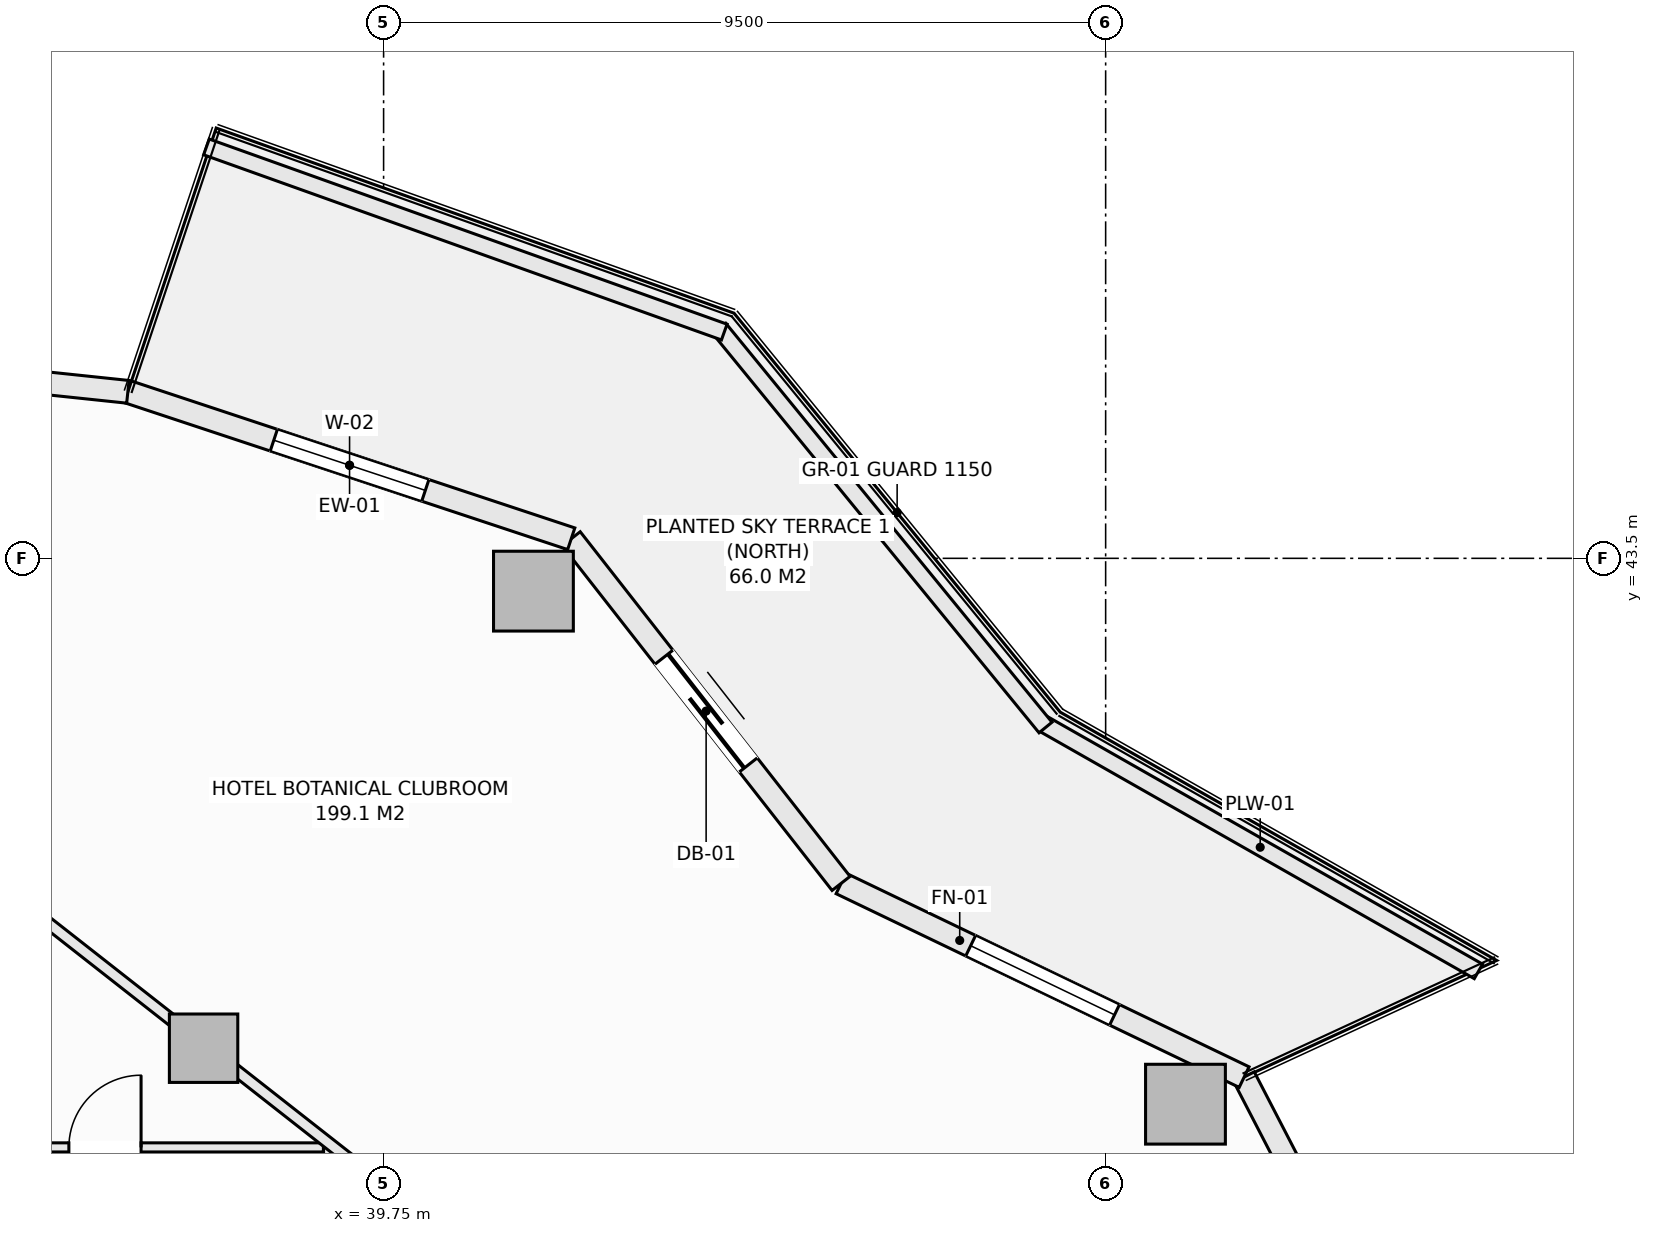
"""IFC4 building model, lengths in metres.
Left out: names, types, materials, properties, quantities, classifications, styles, units other than length and angle.
Written with IfcOpenShell. Run it as: python <this file> out.ifc"""

import sys

from ifc_helpers import new_model, si_unit, direction, frame, frame_2d, origin, origin_2d, place, context, subcontext, project, spatial, rectangle, extrude, element, fill, save


model = new_model("IFC4")
c1 = context("Model", 3, precision=1e-05, world=origin(), true_north=direction((0.0, 1.0)))
c2 = subcontext(c1, "Body", "Model", "MODEL_VIEW")
j1 = project(units=[si_unit("LENGTHUNIT", "METRE"), si_unit("PLANEANGLEUNIT", "RADIAN")], contexts=[c1])
p1 = place(None, origin())
s1 = spatial("IfcSite", under=j1, at=p1, CompositionType="ELEMENT")
p2 = place(p1, origin())
s2 = spatial("IfcBuilding", under=s1, at=p2, CompositionType="ELEMENT")
p3 = place(p2, frame((0.0, 0.0, 115.5)))
s3 = spatial("IfcBuildingStorey", under=s2, at=p3, CompositionType="ELEMENT", Elevation=115.5)
for number, where, z_axis, x_axis in (
    (1, (50.3, 36.319, -0.27), (0.0, 0.0, 1.0), (1.0, 0.0, 0.0)),
    (2, (41.721, 43.068, -0.27), (0.0, 0.0, 1.0), (1.0, 0.0, 0.0)),
):
    element("IfcColumn", number, at=place(p3, frame(where, z_axis=z_axis, x_axis=x_axis)), inside=s3, PredefinedType="COLUMN", context=c2, shape_type="SweptSolid", body=[
        extrude(rectangle(XDim=1.05, YDim=1.05, at=origin_2d()), origin(), (0.0, 0.0, 1.0), 3.4),
    ])
p4 = place(p3, frame((37.382, 37.055, -0.27), z_axis=(0.0, 0.0, 1.0), x_axis=(1.0, 0.0, 0.0)))
e3 = element("IfcColumn", 3, at=p4, inside=s3, PredefinedType="COLUMN", context=c2, shape_type="SweptSolid", body=[
    extrude(rectangle(XDim=0.9, YDim=0.9, at=origin_2d()), origin(), (0.0, 0.0, 1.0), 3.4),
])
p5 = place(p3, frame((51.072, 36.675, 0.0), z_axis=(0.0, 0.0, 1.0), x_axis=(0.459767899643, -0.888039119892, 0.0)))
e4 = element("IfcWall", 4, at=p5, inside=s3, PredefinedType="SOLIDWALL", context=c2, shape_type="SweptSolid", body=[
    extrude(rectangle(XDim=5.255, YDim=0.3, at=frame_2d((2.628, 0.0))), origin(), (0.0, 0.0, 1.0), 2.653),
])
p6 = place(p5, frame((1.578, 0.0, 0.74)))
e5 = element("IfcOpeningElement", 5, at=p6, cuts=e4, PredefinedType="OPENING", context=c2, shape_type="SweptSolid", body=[
    extrude(rectangle(XDim=2.1, YDim=1.7, at=frame_2d((1.05, 0.85))), frame((0.0, 0.16, 0.0), z_axis=(0.0, -1.0, 0.0), x_axis=(1.0, 0.0, 0.0)), (0.0, 0.0, 1.0), 0.32),
])
p7 = place(p3, frame((45.769, 39.223, 0.0), z_axis=(0.0, 0.0, 1.0), x_axis=(0.901370184739, -0.433049408339, 0.0)))
e6 = element("IfcWall", 6, at=p7, inside=s3, PredefinedType="SOLIDWALL", context=c2, shape_type="SweptSolid", body=[
    extrude(rectangle(XDim=5.884, YDim=0.3, at=frame_2d((2.942, 0.0))), origin(), (0.0, 0.0, 1.0), 2.653),
])
p8 = place(p7, frame((1.892, 0.0, 0.74)))
e7 = element("IfcOpeningElement", 7, at=p8, cuts=e6, PredefinedType="OPENING", context=c2, shape_type="SweptSolid", body=[
    extrude(rectangle(XDim=2.1, YDim=1.7, at=frame_2d((1.05, 0.85))), frame((0.0, 0.16, 0.0), z_axis=(0.0, -1.0, 0.0), x_axis=(1.0, 0.0, 0.0)), (0.0, 0.0, 1.0), 0.32),
])
p9 = place(p3, frame((42.219, 43.758, 0.0), z_axis=(0.0, 0.0, 1.0), x_axis=(0.616435134162, -0.787405693001, 0.0)))
e8 = element("IfcWall", 8, at=p9, inside=s3, PredefinedType="SOLIDWALL", context=c2, shape_type="SweptSolid", body=[
    extrude(rectangle(XDim=5.759, YDim=0.3, at=frame_2d((2.879, 0.0))), origin(), (0.0, 0.0, 1.0), 2.653),
])
p10 = place(p9, frame((1.979, 0.0, 0.0)))
e9 = element("IfcOpeningElement", 9, at=p10, cuts=e8, PredefinedType="OPENING", context=c2, shape_type="SweptSolid", body=[
    extrude(rectangle(XDim=1.8, YDim=2.25, at=frame_2d((0.9, 1.125))), frame((0.0, 0.16, 0.0), z_axis=(0.0, -1.0, 0.0), x_axis=(1.0, 0.0, 0.0)), (0.0, 0.0, 1.0), 0.32),
])
p11 = place(p3, frame((36.385, 45.691, 0.0), z_axis=(0.0, 0.0, 1.0), x_axis=(0.949238009374, -0.314558741032, 0.0)))
e10 = element("IfcWall", 10, at=p11, inside=s3, PredefinedType="SOLIDWALL", context=c2, shape_type="SweptSolid", body=[
    extrude(rectangle(XDim=6.146, YDim=0.3, at=frame_2d((3.073, 0.0))), origin(), (0.0, 0.0, 1.0), 2.653),
])
p12 = place(p11, frame((2.023, 0.0, 0.74)))
e11 = element("IfcOpeningElement", 11, at=p12, cuts=e10, PredefinedType="OPENING", context=c2, shape_type="SweptSolid", body=[
    extrude(rectangle(XDim=2.1, YDim=1.7, at=frame_2d((1.05, 0.85))), frame((0.0, 0.16, 0.0), z_axis=(0.0, -1.0, 0.0), x_axis=(1.0, 0.0, 0.0)), (0.0, 0.0, 1.0), 0.32),
])
p13 = place(p3, frame((30.125, 46.35, 0.0), z_axis=(0.0, 0.0, 1.0), x_axis=(0.994498012394, -0.104755445421, 0.0)))
e12 = element("IfcWall", 12, at=p13, inside=s3, PredefinedType="SOLIDWALL", context=c2, shape_type="SweptSolid", body=[
    extrude(rectangle(XDim=6.295, YDim=0.3, at=frame_2d((3.147, 0.0))), origin(), (0.0, 0.0, 1.0), 2.653),
])
p14 = place(p13, frame((2.097, 0.0, 0.74)))
e13 = element("IfcOpeningElement", 13, at=p14, cuts=e12, PredefinedType="OPENING", context=c2, shape_type="SweptSolid", body=[
    extrude(rectangle(XDim=2.1, YDim=1.7, at=frame_2d((1.05, 0.85))), frame((0.0, 0.16, 0.0), z_axis=(0.0, -1.0, 0.0), x_axis=(1.0, 0.0, 0.0)), (0.0, 0.0, 1.0), 0.32),
])
p15 = place(p3, frame((48.413, 41.332, 0.0), z_axis=(0.0, 0.0, 1.0), x_axis=(0.869187658335, -0.494482370361, 0.0)))
e14 = element("IfcWall", 14, at=p15, inside=s3, PredefinedType="PARAPET", context=c2, shape_type="SweptSolid", body=[
    extrude(rectangle(XDim=6.606, YDim=0.22, at=frame_2d((3.303, 0.0))), origin(), (0.0, 0.0, 1.0), 0.52),
])
p16 = place(p3, frame((44.167, 46.523, 0.0), z_axis=(0.0, 0.0, 1.0), x_axis=(0.633002467947, -0.77414977593, 0.0)))
e15 = element("IfcWall", 15, at=p16, inside=s3, PredefinedType="PARAPET", context=c2, shape_type="SweptSolid", body=[
    extrude(rectangle(XDim=6.78, YDim=0.22, at=frame_2d((3.39, 0.0))), origin(), (0.0, 0.0, 1.0), 0.52),
])
p17 = place(p3, frame((37.419, 48.913, 0.0), z_axis=(0.0, 0.0, 1.0), x_axis=(0.941632697311, -0.336642040387, 0.0)))
e16 = element("IfcWall", 16, at=p17, inside=s3, PredefinedType="PARAPET", context=c2, shape_type="SweptSolid", body=[
    extrude(rectangle(XDim=7.236, YDim=0.22, at=frame_2d((3.618, 0.0))), origin(), (0.0, 0.0, 1.0), 0.52),
])
p18 = place(p3, frame((39.02, 33.75, 0.0), z_axis=(0.0, 0.0, 1.0), x_axis=(0.0, 1.0, 0.0)))
e17 = element("IfcWall", 17, at=p18, inside=s3, PredefinedType="PARTITIONING", context=c2, shape_type="SweptSolid", body=[
    extrude(rectangle(XDim=2.0, YDim=0.12, at=frame_2d((1.0, 0.0))), origin(), (0.0, 0.0, 1.0), 3.13),
])
p19 = place(p3, frame((34.05, 35.75, 0.0), z_axis=(0.0, 0.0, 1.0), x_axis=(1.0, 0.0, 0.0)))
e18 = element("IfcWall", 18, at=p19, inside=s3, PredefinedType="PARTITIONING", context=c2, shape_type="SweptSolid", body=[
    extrude(rectangle(XDim=4.908, YDim=0.12, at=frame_2d((2.454, 0.0))), origin(), (0.0, 0.0, 1.0), 2.505),
])
p20 = place(p19, frame((1.559, 0.0, 0.0)))
e19 = element("IfcOpeningElement", 19, at=p20, cuts=e18, PredefinedType="OPENING", context=c2, shape_type="SweptSolid", body=[
    extrude(rectangle(XDim=0.95, YDim=2.1, at=frame_2d((0.475, 1.05))), frame((0.0, 0.07, 0.0), z_axis=(0.0, -1.0, 0.0), x_axis=(1.0, 0.0, 0.0)), (0.0, 0.0, 1.0), 0.14),
])
p21 = place(p3, frame((34.112, 39.661, 0.0), z_axis=(0.0, 0.0, 1.0), x_axis=(0.786863471843, -0.617127115495, 0.0)))
e20 = element("IfcWall", 20, at=p21, inside=s3, PredefinedType="PARTITIONING", context=c2, shape_type="SweptSolid", body=[
    extrude(rectangle(XDim=14.103, YDim=0.15, at=frame_2d((7.052, 0.0))), origin(), (0.0, 0.0, 1.0), 2.505),
])
p22 = place(p8, origin())
e21 = element("IfcWindow", 21, at=p22, inside=s3, PartitioningType="SINGLE_PANEL", PredefinedType="WINDOW", context=c2, shape_type="SweptSolid", body=[
    extrude(rectangle(XDim=2.1, YDim=1.7, at=frame_2d((1.05, 0.85))), frame((0.0, 0.03, 0.0), z_axis=(0.0, -1.0, 0.0), x_axis=(1.0, 0.0, 0.0)), (0.0, 0.0, 1.0), 0.06),
])
fill(e7, e21)
p23 = place(p10, origin())
e22 = element("IfcDoor", 22, at=p23, inside=s3, OperationType="SLIDING_TO_LEFT", PredefinedType="DOOR", context=c2, shape_type="SweptSolid", body=[
    extrude(rectangle(XDim=1.8, YDim=2.25, at=frame_2d((0.9, 1.125))), frame((0.0, 0.025, 0.0), z_axis=(0.0, -1.0, 0.0), x_axis=(1.0, 0.0, 0.0)), (0.0, 0.0, 1.0), 0.05),
])
fill(e9, e22)
p24 = place(p12, origin())
e23 = element("IfcWindow", 23, at=p24, inside=s3, PartitioningType="SINGLE_PANEL", PredefinedType="WINDOW", context=c2, shape_type="SweptSolid", body=[
    extrude(rectangle(XDim=2.1, YDim=1.7, at=frame_2d((1.05, 0.85))), frame((0.0, 0.03, 0.0), z_axis=(0.0, -1.0, 0.0), x_axis=(1.0, 0.0, 0.0)), (0.0, 0.0, 1.0), 0.06),
])
fill(e11, e23)
p25 = place(p20, origin())
e24 = element("IfcDoor", 24, at=p25, inside=s3, OperationType="SINGLE_SWING_RIGHT", PredefinedType="DOOR", context=c2, shape_type="SweptSolid", body=[
    extrude(rectangle(XDim=0.95, YDim=2.1, at=frame_2d((0.475, 1.05))), frame((0.0, 0.025, 0.0), z_axis=(0.0, -1.0, 0.0), x_axis=(1.0, 0.0, 0.0)), (0.0, 0.0, 1.0), 0.05),
])
fill(e19, e24)
save(model, sys.argv[1])
